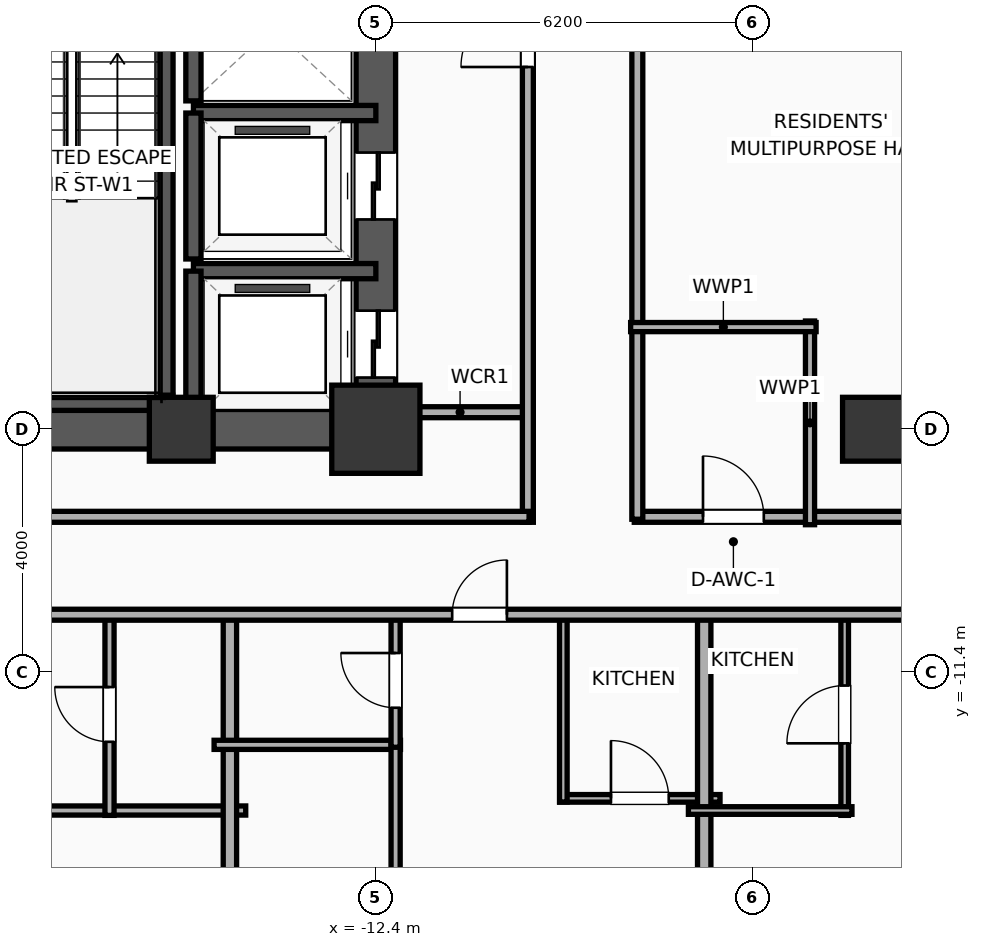
"""IFC4 building model, lengths in metres.
Left out: names, types, materials, properties, quantities, classifications, styles, units other than length and angle.
Written with IfcOpenShell. Run it as: python <this file> out.ifc"""

import sys

from ifc_helpers import new_model, si_unit, direction, frame, frame_2d, origin, origin_2d, place, context, subcontext, project, spatial, rectangle, extrude, element, fill, save


model = new_model("IFC4")
c1 = context("Model", 3, precision=1e-05, world=origin(), true_north=direction((0.0, 1.0)))
c2 = subcontext(c1, "Body", "Model", "MODEL_VIEW")
j1 = project(units=[si_unit("LENGTHUNIT", "METRE"), si_unit("PLANEANGLEUNIT", "RADIAN")], contexts=[c1])
p1 = place(None, origin())
s1 = spatial("IfcSite", under=j1, at=p1, CompositionType="ELEMENT")
p2 = place(p1, origin())
s2 = spatial("IfcBuilding", under=s1, at=p2, CompositionType="ELEMENT")
p3 = place(p2, frame((0.0, 0.0, 26.0)))
s3 = spatial("IfcBuildingStorey", under=s2, at=p3, CompositionType="ELEMENT", Elevation=26.0)
p4 = place(p3, frame((-15.6, -7.4, 0.0), z_axis=(0.0, 0.0, 1.0), x_axis=(1.0, 0.0, 0.0)))
e1 = element("IfcColumn", 1, at=p4, inside=s3, PredefinedType="COLUMN", context=c2, shape_type="SweptSolid", body=[
    extrude(rectangle(XDim=1.05, YDim=1.05, at=origin_2d()), origin(), (0.0, 0.0, 1.0), 3.9),
])
p5 = place(p3, frame((-12.4, -7.4, 0.0), z_axis=(0.0, 0.0, 1.0), x_axis=(1.0, 0.0, 0.0)))
e2 = element("IfcColumn", 2, at=p5, inside=s3, PredefinedType="COLUMN", context=c2, shape_type="SweptSolid", body=[
    extrude(rectangle(XDim=1.45, YDim=1.45, at=origin_2d()), origin(), (0.0, 0.0, 1.0), 3.9),
])
p6 = place(p3, frame((-19.525, -7.4, 0.0), z_axis=(0.0, 0.0, 1.0), x_axis=(1.0, 0.0, 0.0)))
e3 = element("IfcWall", 3, at=p6, inside=s3, PredefinedType="SHEAR", context=c2, shape_type="SweptSolid", body=[
    extrude(rectangle(XDim=7.45, YDim=0.65, at=frame_2d((3.725, 0.0))), origin(), (0.0, 0.0, 1.0), 3.65),
])
p7 = place(p3, frame((-12.4, -7.4, 0.0), z_axis=(0.0, 0.0, 1.0), x_axis=(0.0, 1.0, 0.0)))
e4 = element("IfcWall", 4, at=p7, inside=s3, PredefinedType="SHEAR", context=c2, shape_type="SweptSolid", body=[
    extrude(rectangle(XDim=14.8, YDim=0.65, at=frame_2d((7.4, 0.0))), origin(), (0.0, 0.0, 1.0), 3.65),
])
p8 = place(p7, frame((0.85, 0.0, 0.0)))
e5 = element("IfcOpeningElement", 5, at=p8, cuts=e4, PredefinedType="OPENING", context=c2, shape_type="SweptSolid", body=[
    extrude(rectangle(XDim=1.1, YDim=2.05, at=frame_2d((0.55, 1.025))), frame((0.0, 0.335, 0.0), z_axis=(0.0, -1.0, 0.0), x_axis=(1.0, 0.0, 0.0)), (0.0, 0.0, 1.0), 0.67),
])
p9 = place(p7, frame((3.45, 0.0, 0.0)))
e6 = element("IfcOpeningElement", 6, at=p9, cuts=e4, PredefinedType="OPENING", context=c2, shape_type="SweptSolid", body=[
    extrude(rectangle(XDim=1.1, YDim=2.05, at=frame_2d((0.55, 1.025))), frame((0.0, 0.335, 0.0), z_axis=(0.0, -1.0, 0.0), x_axis=(1.0, 0.0, 0.0)), (0.0, 0.0, 1.0), 0.67),
])
p10 = place(p7, frame((10.53, 0.0, 0.0)))
e7 = element("IfcOpeningElement", 7, at=p10, cuts=e4, PredefinedType="OPENING", context=c2, shape_type="SweptSolid", body=[
    extrude(rectangle(XDim=1.1, YDim=2.05, at=frame_2d((0.55, 1.025))), frame((0.0, 0.335, 0.0), z_axis=(0.0, -1.0, 0.0), x_axis=(1.0, 0.0, 0.0)), (0.0, 0.0, 1.0), 0.67),
])
p11 = place(p3, frame((-15.86, -7.085, 0.0), z_axis=(0.0, 0.0, 1.0), x_axis=(0.0, 1.0, 0.0)))
e8 = element("IfcWall", 8, at=p11, inside=s3, PredefinedType="SOLIDWALL", context=c2, shape_type="SweptSolid", body=[
    extrude(rectangle(XDim=7.685, YDim=0.25, at=frame_2d((3.843, 0.0))), origin(), (0.0, 0.0, 1.0), 3.65),
])
p12 = place(p3, frame((-19.2, -6.965, 0.0), z_axis=(0.0, 0.0, 1.0), x_axis=(1.0, 0.0, 0.0)))
e9 = element("IfcWall", 9, at=p12, inside=s3, PredefinedType="SOLIDWALL", context=c2, shape_type="SweptSolid", body=[
    extrude(rectangle(XDim=3.46, YDim=0.25, at=frame_2d((1.73, 0.0))), origin(), (0.0, 0.0, 1.0), 3.65),
])
p13 = place(p3, frame((-4.2, -7.4, 0.0), z_axis=(0.0, 0.0, 1.0), x_axis=(1.0, 0.0, 0.0)))
e10 = element("IfcColumn", 10, at=p13, inside=s3, PredefinedType="COLUMN", context=c2, shape_type="SweptSolid", body=[
    extrude(rectangle(XDim=1.05, YDim=1.05, at=origin_2d()), origin(), (0.0, 0.0, 1.0), 3.9),
])
p14 = place(p3, frame((-12.4, -4.8, 0.0), z_axis=(0.0, 0.0, 1.0), x_axis=(-1.0, 0.0, 0.0)))
e11 = element("IfcWall", 11, at=p14, inside=s3, PredefinedType="SOLIDWALL", context=c2, shape_type="SweptSolid", body=[
    extrude(rectangle(XDim=3.0, YDim=0.25, at=frame_2d((1.5, 0.0))), origin(), (0.0, 0.0, 1.0), 3.65),
])
p15 = place(p3, frame((-15.4, -4.8, 0.0), z_axis=(0.0, 0.0, 1.0), x_axis=(0.0, -1.0, 0.0)))
e12 = element("IfcWall", 12, at=p15, inside=s3, PredefinedType="SOLIDWALL", context=c2, shape_type="SweptSolid", body=[
    extrude(rectangle(XDim=2.6, YDim=0.25, at=frame_2d((1.3, 0.0))), origin(), (0.0, 0.0, 1.0), 3.65),
])
p16 = place(p3, frame((-12.4, -2.2, 0.0), z_axis=(0.0, 0.0, 1.0), x_axis=(-1.0, 0.0, 0.0)))
e13 = element("IfcWall", 13, at=p16, inside=s3, PredefinedType="SOLIDWALL", context=c2, shape_type="SweptSolid", body=[
    extrude(rectangle(XDim=3.0, YDim=0.25, at=frame_2d((1.5, 0.0))), origin(), (0.0, 0.0, 1.0), 3.65),
])
p17 = place(p3, frame((-15.4, -2.2, 0.0), z_axis=(0.0, 0.0, 1.0), x_axis=(0.0, -1.0, 0.0)))
e14 = element("IfcWall", 14, at=p17, inside=s3, PredefinedType="SOLIDWALL", context=c2, shape_type="SweptSolid", body=[
    extrude(rectangle(XDim=2.4, YDim=0.25, at=frame_2d((1.2, 0.0))), origin(), (0.0, 0.0, 1.0), 3.65),
])
p18 = place(p3, frame((-15.4, 0.4, 0.0), z_axis=(0.0, 0.0, 1.0), x_axis=(0.0, -1.0, 0.0)))
e15 = element("IfcWall", 15, at=p18, inside=s3, PredefinedType="SOLIDWALL", context=c2, shape_type="SweptSolid", body=[
    extrude(rectangle(XDim=2.4, YDim=0.25, at=frame_2d((1.2, 0.0))), origin(), (0.0, 0.0, 1.0), 3.65),
])
p19 = place(p3, frame((-12.15, -7.12, 0.0), z_axis=(0.0, 0.0, 1.0), x_axis=(1.0, 0.0, 0.0)))
e16 = element("IfcWall", 16, at=p19, inside=s3, PredefinedType="PARTITIONING", context=c2, shape_type="SweptSolid", body=[
    extrude(rectangle(XDim=2.27, YDim=0.18, at=frame_2d((1.135, 0.0))), origin(), (0.0, 0.0, 1.0), 2.94),
])
p20 = place(p3, frame((-9.9, -8.93, 0.0), z_axis=(0.0, 0.0, 1.0), x_axis=(0.0, 1.0, 0.0)))
e17 = element("IfcWall", 17, at=p20, inside=s3, PredefinedType="PARTITIONING", context=c2, shape_type="SweptSolid", body=[
    extrude(rectangle(XDim=17.86, YDim=0.18, at=frame_2d((8.93, 0.0))), origin(), (0.0, 0.0, 1.0), 3.65),
])
p21 = place(p20, frame((7.487, 0.0, 0.0)))
e18 = element("IfcOpeningElement", 18, at=p21, cuts=e17, PredefinedType="OPENING", context=c2, shape_type="SweptSolid", body=[
    extrude(rectangle(XDim=1.1, YDim=2.05, at=frame_2d((0.55, 1.025))), frame((0.0, 0.1, 0.0), z_axis=(0.0, -1.0, 0.0), x_axis=(1.0, 0.0, 0.0)), (0.0, 0.0, 1.0), 0.2),
])
p22 = place(p3, frame((-33.41, -8.84, 0.0), z_axis=(0.0, 0.0, 1.0), x_axis=(1.0, 0.0, 0.0)))
e19 = element("IfcWall", 19, at=p22, inside=s3, PredefinedType="PARTITIONING", context=c2, shape_type="SweptSolid", body=[
    extrude(rectangle(XDim=23.53, YDim=0.18, at=frame_2d((11.765, 0.0))), origin(), (0.0, 0.0, 1.0), 3.65),
])
p23 = place(p3, frame((-8.15, -8.84, 0.0), z_axis=(0.0, 0.0, 1.0), x_axis=(1.0, 0.0, 0.0)))
e20 = element("IfcWall", 20, at=p23, inside=s3, PredefinedType="PARTITIONING", context=c2, shape_type="SweptSolid", body=[
    extrude(rectangle(XDim=16.3, YDim=0.18, at=frame_2d((8.15, 0.0))), origin(), (0.0, 0.0, 1.0), 3.65),
])
p24 = place(p23, frame((1.13, 0.0, 0.0)))
e21 = element("IfcOpeningElement", 21, at=p24, cuts=e20, PredefinedType="OPENING", context=c2, shape_type="SweptSolid", body=[
    extrude(rectangle(XDim=1.0, YDim=2.05, at=frame_2d((0.5, 1.025))), frame((0.0, 0.1, 0.0), z_axis=(0.0, -1.0, 0.0), x_axis=(1.0, 0.0, 0.0)), (0.0, 0.0, 1.0), 0.2),
])
p25 = place(p23, frame((10.12, 0.0, 0.0)))
e22 = element("IfcOpeningElement", 22, at=p25, cuts=e20, PredefinedType="OPENING", context=c2, shape_type="SweptSolid", body=[
    extrude(rectangle(XDim=0.95, YDim=2.05, at=frame_2d((0.475, 1.025))), frame((0.0, 0.1, 0.0), z_axis=(0.0, -1.0, 0.0), x_axis=(1.0, 0.0, 0.0)), (0.0, 0.0, 1.0), 0.2),
])
p26 = place(p3, frame((-8.1, -8.88, 0.0), z_axis=(0.0, 0.0, 1.0), x_axis=(0.0, 1.0, 0.0)))
e23 = element("IfcWall", 23, at=p26, inside=s3, PredefinedType="PARTITIONING", context=c2, shape_type="SweptSolid", body=[
    extrude(rectangle(XDim=17.76, YDim=0.18, at=frame_2d((8.88, 0.0))), origin(), (0.0, 0.0, 1.0), 3.65),
])
p27 = place(p3, frame((-5.26, -8.97, 0.0), z_axis=(0.0, 0.0, 1.0), x_axis=(0.0, 1.0, 0.0)))
e24 = element("IfcWall", 24, at=p27, inside=s3, PredefinedType="PLUMBINGWALL", context=c2, shape_type="SweptSolid", body=[
    extrude(rectangle(XDim=3.35, YDim=0.15, at=frame_2d((1.675, 0.0))), origin(), (0.0, 0.0, 1.0), 3.65),
])
p28 = place(p3, frame((-8.21, -5.72, 0.0), z_axis=(0.0, 0.0, 1.0), x_axis=(1.0, 0.0, 0.0)))
e25 = element("IfcWall", 25, at=p28, inside=s3, PredefinedType="PLUMBINGWALL", context=c2, shape_type="SweptSolid", body=[
    extrude(rectangle(XDim=3.05, YDim=0.15, at=frame_2d((1.525, 0.0))), origin(), (0.0, 0.0, 1.0), 3.65),
])
p29 = place(p3, frame((-18.33, -13.67, 0.0), z_axis=(0.0, 0.0, 1.0), x_axis=(1.0, 0.0, 0.0)))
e26 = element("IfcWall", 26, at=p29, inside=s3, PredefinedType="PLUMBINGWALL", context=c2, shape_type="SweptSolid", body=[
    extrude(rectangle(XDim=3.79, YDim=0.15, at=frame_2d((1.895, 0.0))), origin(), (0.0, 0.0, 1.0), 3.65),
])
p30 = place(p3, frame((-16.78, -13.75, 0.0), z_axis=(0.0, 0.0, 1.0), x_axis=(0.0, 1.0, 0.0)))
e27 = element("IfcWall", 27, at=p30, inside=s3, PredefinedType="PLUMBINGWALL", context=c2, shape_type="SweptSolid", body=[
    extrude(rectangle(XDim=3.32, YDim=0.15, at=frame_2d((1.66, 0.0))), origin(), (0.0, 0.0, 1.0), 3.65),
])
p31 = place(p30, frame((1.21, 0.0, 0.0)))
e28 = element("IfcOpeningElement", 28, at=p31, cuts=e27, PredefinedType="OPENING", context=c2, shape_type="SweptSolid", body=[
    extrude(rectangle(XDim=0.9, YDim=2.05, at=frame_2d((0.45, 1.025))), frame((0.0, 0.085, 0.0), z_axis=(0.0, -1.0, 0.0), x_axis=(1.0, 0.0, 0.0)), (0.0, 0.0, 1.0), 0.17),
])
p32 = place(p3, frame((-14.8, -22.21, 0.0), z_axis=(0.0, 0.0, 1.0), x_axis=(0.0, 1.0, 0.0)))
e29 = element("IfcWall", 29, at=p32, inside=s3, PredefinedType="PARTITIONING", context=c2, shape_type="SweptSolid", body=[
    extrude(rectangle(XDim=11.84, YDim=0.22, at=frame_2d((5.92, 0.0))), origin(), (0.0, 0.0, 1.0), 3.65),
])
p33 = place(p3, frame((-15.06, -12.59, 0.0), z_axis=(0.0, 0.0, 1.0), x_axis=(1.0, 0.0, 0.0)))
e30 = element("IfcWall", 30, at=p33, inside=s3, PredefinedType="PLUMBINGWALL", context=c2, shape_type="SweptSolid", body=[
    extrude(rectangle(XDim=3.065, YDim=0.15, at=frame_2d((1.532, 0.0))), origin(), (0.0, 0.0, 1.0), 3.65),
])
p34 = place(p3, frame((-12.075, -22.258, 0.0), z_axis=(0.0, 0.0, 1.0), x_axis=(0.0, 1.0, 0.0)))
e31 = element("IfcWall", 31, at=p34, inside=s3, PredefinedType="PLUMBINGWALL", context=c2, shape_type="SweptSolid", body=[
    extrude(rectangle(XDim=9.708, YDim=0.15, at=frame_2d((4.854, 0.0))), origin(), (0.0, 0.0, 1.0), 3.65),
])
p35 = place(p34, frame((6.54, 0.0, 0.0)))
e32 = element("IfcOpeningElement", 32, at=p35, cuts=e31, PredefinedType="OPENING", context=c2, shape_type="SweptSolid", body=[
    extrude(rectangle(XDim=0.9, YDim=2.05, at=frame_2d((0.45, 1.025))), frame((0.0, 0.085, 0.0), z_axis=(0.0, -1.0, 0.0), x_axis=(1.0, 0.0, 0.0)), (0.0, 0.0, 1.0), 0.17),
])
p36 = place(p3, frame((-12.075, -12.63, 0.0), z_axis=(0.0, 0.0, 1.0), x_axis=(0.0, 1.0, 0.0)))
e33 = element("IfcWall", 33, at=p36, inside=s3, PredefinedType="PLUMBINGWALL", context=c2, shape_type="SweptSolid", body=[
    extrude(rectangle(XDim=2.2, YDim=0.15, at=frame_2d((1.1, 0.0))), origin(), (0.0, 0.0, 1.0), 2.54),
])
p37 = place(p36, frame((0.65, 0.0, 0.0)))
e34 = element("IfcOpeningElement", 34, at=p37, cuts=e33, PredefinedType="OPENING", context=c2, shape_type="SweptSolid", body=[
    extrude(rectangle(XDim=0.9, YDim=2.05, at=frame_2d((0.45, 1.025))), frame((0.0, 0.085, 0.0), z_axis=(0.0, -1.0, 0.0), x_axis=(1.0, 0.0, 0.0)), (0.0, 0.0, 1.0), 0.17),
])
p38 = place(p3, frame((-9.377, -13.47, 0.0), z_axis=(0.0, 0.0, 1.0), x_axis=(1.0, 0.0, 0.0)))
e35 = element("IfcWall", 35, at=p38, inside=s3, PredefinedType="PARTITIONING", context=c2, shape_type="SweptSolid", body=[
    extrude(rectangle(XDim=2.637, YDim=0.125, at=frame_2d((1.318, 0.0))), origin(), (0.0, 0.0, 1.0), 3.65),
])
p39 = place(p38, frame((0.844, 0.0, 0.0)))
e36 = element("IfcOpeningElement", 36, at=p39, cuts=e35, PredefinedType="OPENING", context=c2, shape_type="SweptSolid", body=[
    extrude(rectangle(XDim=0.95, YDim=2.05, at=frame_2d((0.475, 1.025))), frame((0.0, 0.073, 0.0), z_axis=(0.0, -1.0, 0.0), x_axis=(1.0, 0.0, 0.0)), (0.0, 0.0, 1.0), 0.145),
])
p40 = place(p3, frame((-9.317, -13.53, 0.0), z_axis=(0.0, 0.0, 1.0), x_axis=(0.0, 1.0, 0.0)))
e37 = element("IfcWall", 37, at=p40, inside=s3, PredefinedType="PARTITIONING", context=c2, shape_type="SweptSolid", body=[
    extrude(rectangle(XDim=3.1, YDim=0.125, at=frame_2d((1.55, 0.0))), origin(), (0.0, 0.0, 1.0), 3.65),
])
p41 = place(p3, frame((-7.0, -22.21, 0.0), z_axis=(0.0, 0.0, 1.0), x_axis=(0.0, 1.0, 0.0)))
e38 = element("IfcWall", 38, at=p41, inside=s3, PredefinedType="PARTITIONING", context=c2, shape_type="SweptSolid", body=[
    extrude(rectangle(XDim=11.84, YDim=0.22, at=frame_2d((5.92, 0.0))), origin(), (0.0, 0.0, 1.0), 3.65),
])
p42 = place(p3, frame((-4.69, -13.75, 0.0), z_axis=(0.0, 0.0, 1.0), x_axis=(0.0, 1.0, 0.0)))
e39 = element("IfcWall", 39, at=p42, inside=s3, PredefinedType="PARTITIONING", context=c2, shape_type="SweptSolid", body=[
    extrude(rectangle(XDim=3.32, YDim=0.125, at=frame_2d((1.66, 0.0))), origin(), (0.0, 0.0, 1.0), 3.65),
])
p43 = place(p42, frame((1.185, 0.0, 0.0)))
e40 = element("IfcOpeningElement", 40, at=p43, cuts=e39, PredefinedType="OPENING", context=c2, shape_type="SweptSolid", body=[
    extrude(rectangle(XDim=0.95, YDim=2.05, at=frame_2d((0.475, 1.025))), frame((0.0, 0.073, 0.0), z_axis=(0.0, -1.0, 0.0), x_axis=(1.0, 0.0, 0.0)), (0.0, 0.0, 1.0), 0.145),
])
p44 = place(p3, frame((-7.26, -13.67, 0.0), z_axis=(0.0, 0.0, 1.0), x_axis=(1.0, 0.0, 0.0)))
e41 = element("IfcWall", 41, at=p44, inside=s3, PredefinedType="PARTITIONING", context=c2, shape_type="SweptSolid", body=[
    extrude(rectangle(XDim=2.69, YDim=0.125, at=frame_2d((1.345, 0.0))), origin(), (0.0, 0.0, 1.0), 3.65),
])
p45 = place(p3, frame((-33.41, -10.45, 0.0), z_axis=(0.0, 0.0, 1.0), x_axis=(1.0, 0.0, 0.0)))
e42 = element("IfcWall", 42, at=p45, inside=s3, PredefinedType="PARTITIONING", context=c2, shape_type="SweptSolid", body=[
    extrude(rectangle(XDim=59.62, YDim=0.18, at=frame_2d((29.81, 0.0))), origin(), (0.0, 0.0, 1.0), 3.65),
])
p46 = place(p45, frame((5.321, 0.0, 0.0)))
e43 = element("IfcOpeningElement", 43, at=p46, cuts=e42, PredefinedType="OPENING", context=c2, shape_type="SweptSolid", body=[
    extrude(rectangle(XDim=1.15, YDim=2.05, at=frame_2d((0.575, 1.025))), frame((0.0, 0.1, 0.0), z_axis=(0.0, -1.0, 0.0), x_axis=(1.0, 0.0, 0.0)), (0.0, 0.0, 1.0), 0.2),
])
p47 = place(p45, frame((14.3, 0.0, 0.0)))
e44 = element("IfcOpeningElement", 44, at=p47, cuts=e42, PredefinedType="OPENING", context=c2, shape_type="SweptSolid", body=[
    extrude(rectangle(XDim=1.15, YDim=2.05, at=frame_2d((0.575, 1.025))), frame((0.0, 0.1, 0.0), z_axis=(0.0, -1.0, 0.0), x_axis=(1.0, 0.0, 0.0)), (0.0, 0.0, 1.0), 0.2),
])
p48 = place(p45, frame((22.265, 0.0, 0.0)))
e45 = element("IfcOpeningElement", 45, at=p48, cuts=e42, PredefinedType="OPENING", context=c2, shape_type="SweptSolid", body=[
    extrude(rectangle(XDim=0.9, YDim=2.05, at=frame_2d((0.45, 1.025))), frame((0.0, 0.1, 0.0), z_axis=(0.0, -1.0, 0.0), x_axis=(1.0, 0.0, 0.0)), (0.0, 0.0, 1.0), 0.2),
])
p49 = place(p45, frame((29.903, 0.0, 0.0)))
e46 = element("IfcOpeningElement", 46, at=p49, cuts=e42, PredefinedType="OPENING", context=c2, shape_type="SweptSolid", body=[
    extrude(rectangle(XDim=1.15, YDim=2.05, at=frame_2d((0.575, 1.025))), frame((0.0, 0.1, 0.0), z_axis=(0.0, -1.0, 0.0), x_axis=(1.0, 0.0, 0.0)), (0.0, 0.0, 1.0), 0.2),
])
p50 = place(p45, frame((37.701, 0.0, 0.0)))
e47 = element("IfcOpeningElement", 47, at=p50, cuts=e42, PredefinedType="OPENING", context=c2, shape_type="SweptSolid", body=[
    extrude(rectangle(XDim=1.15, YDim=2.05, at=frame_2d((0.575, 1.025))), frame((0.0, 0.1, 0.0), z_axis=(0.0, -1.0, 0.0), x_axis=(1.0, 0.0, 0.0)), (0.0, 0.0, 1.0), 0.2),
])
p51 = place(p45, frame((45.654, 0.0, 0.0)))
e48 = element("IfcOpeningElement", 48, at=p51, cuts=e42, PredefinedType="OPENING", context=c2, shape_type="SweptSolid", body=[
    extrude(rectangle(XDim=0.9, YDim=2.05, at=frame_2d((0.45, 1.025))), frame((0.0, 0.1, 0.0), z_axis=(0.0, -1.0, 0.0), x_axis=(1.0, 0.0, 0.0)), (0.0, 0.0, 1.0), 0.2),
])
p52 = place(p45, frame((54.472, 0.0, 0.0)))
e49 = element("IfcOpeningElement", 49, at=p52, cuts=e42, PredefinedType="OPENING", context=c2, shape_type="SweptSolid", body=[
    extrude(rectangle(XDim=1.15, YDim=2.05, at=frame_2d((0.575, 1.025))), frame((0.0, 0.1, 0.0), z_axis=(0.0, -1.0, 0.0), x_axis=(1.0, 0.0, 0.0)), (0.0, 0.0, 1.0), 0.2),
])
p53 = place(p8, origin())
e50 = element("IfcDoor", 50, at=p53, inside=s3, OperationType="SLIDING_TO_LEFT", PredefinedType="DOOR", context=c2, shape_type="SweptSolid", body=[
    extrude(rectangle(XDim=1.1, YDim=2.05, at=frame_2d((0.55, 1.025))), frame((0.0, 0.025, 0.0), z_axis=(0.0, -1.0, 0.0), x_axis=(1.0, 0.0, 0.0)), (0.0, 0.0, 1.0), 0.05),
])
fill(e5, e50)
p54 = place(p9, origin())
e51 = element("IfcDoor", 51, at=p54, inside=s3, OperationType="SLIDING_TO_LEFT", PredefinedType="DOOR", context=c2, shape_type="SweptSolid", body=[
    extrude(rectangle(XDim=1.1, YDim=2.05, at=frame_2d((0.55, 1.025))), frame((0.0, 0.025, 0.0), z_axis=(0.0, -1.0, 0.0), x_axis=(1.0, 0.0, 0.0)), (0.0, 0.0, 1.0), 0.05),
])
fill(e6, e51)
p55 = place(p21, origin())
e52 = element("IfcDoor", 52, at=p55, inside=s3, OperationType="SINGLE_SWING_LEFT", PredefinedType="DOOR", context=c2, shape_type="SweptSolid", body=[
    extrude(rectangle(XDim=1.1, YDim=2.05, at=frame_2d((0.55, 1.025))), frame((0.0, 0.025, 0.0), z_axis=(0.0, -1.0, 0.0), x_axis=(1.0, 0.0, 0.0)), (0.0, 0.0, 1.0), 0.05),
])
fill(e18, e52)
p56 = place(p24, origin())
e53 = element("IfcDoor", 53, at=p56, inside=s3, OperationType="SINGLE_SWING_LEFT", PredefinedType="DOOR", context=c2, shape_type="SweptSolid", body=[
    extrude(rectangle(XDim=1.0, YDim=2.05, at=frame_2d((0.5, 1.025))), frame((0.0, 0.025, 0.0), z_axis=(0.0, -1.0, 0.0), x_axis=(1.0, 0.0, 0.0)), (0.0, 0.0, 1.0), 0.05),
])
fill(e21, e53)
p57 = place(p31, origin())
e54 = element("IfcDoor", 54, at=p57, inside=s3, OperationType="SINGLE_SWING_RIGHT", PredefinedType="DOOR", context=c2, shape_type="SweptSolid", body=[
    extrude(rectangle(XDim=0.9, YDim=2.05, at=frame_2d((0.45, 1.025))), frame((0.0, 0.025, 0.0), z_axis=(0.0, -1.0, 0.0), x_axis=(1.0, 0.0, 0.0)), (0.0, 0.0, 1.0), 0.05),
])
fill(e28, e54)
p58 = place(p37, origin())
e55 = element("IfcDoor", 55, at=p58, inside=s3, OperationType="SINGLE_SWING_RIGHT", PredefinedType="DOOR", context=c2, shape_type="SweptSolid", body=[
    extrude(rectangle(XDim=0.9, YDim=2.05, at=frame_2d((0.45, 1.025))), frame((0.0, 0.025, 0.0), z_axis=(0.0, -1.0, 0.0), x_axis=(1.0, 0.0, 0.0)), (0.0, 0.0, 1.0), 0.05),
])
fill(e34, e55)
p59 = place(p39, origin())
e56 = element("IfcDoor", 56, at=p59, inside=s3, OperationType="SINGLE_SWING_LEFT", PredefinedType="DOOR", context=c2, shape_type="SweptSolid", body=[
    extrude(rectangle(XDim=0.95, YDim=2.05, at=frame_2d((0.475, 1.025))), frame((0.0, 0.025, 0.0), z_axis=(0.0, -1.0, 0.0), x_axis=(1.0, 0.0, 0.0)), (0.0, 0.0, 1.0), 0.05),
])
fill(e36, e56)
p60 = place(p43, origin())
e57 = element("IfcDoor", 57, at=p60, inside=s3, OperationType="SINGLE_SWING_LEFT", PredefinedType="DOOR", context=c2, shape_type="SweptSolid", body=[
    extrude(rectangle(XDim=0.95, YDim=2.05, at=frame_2d((0.475, 1.025))), frame((0.0, 0.025, 0.0), z_axis=(0.0, -1.0, 0.0), x_axis=(1.0, 0.0, 0.0)), (0.0, 0.0, 1.0), 0.05),
])
fill(e40, e57)
p61 = place(p48, origin())
e58 = element("IfcDoor", 58, at=p61, inside=s3, OperationType="SINGLE_SWING_RIGHT", PredefinedType="DOOR", context=c2, shape_type="SweptSolid", body=[
    extrude(rectangle(XDim=0.9, YDim=2.05, at=frame_2d((0.45, 1.025))), frame((0.0, 0.025, 0.0), z_axis=(0.0, -1.0, 0.0), x_axis=(1.0, 0.0, 0.0)), (0.0, 0.0, 1.0), 0.05),
])
fill(e45, e58)
save(model, sys.argv[1])
